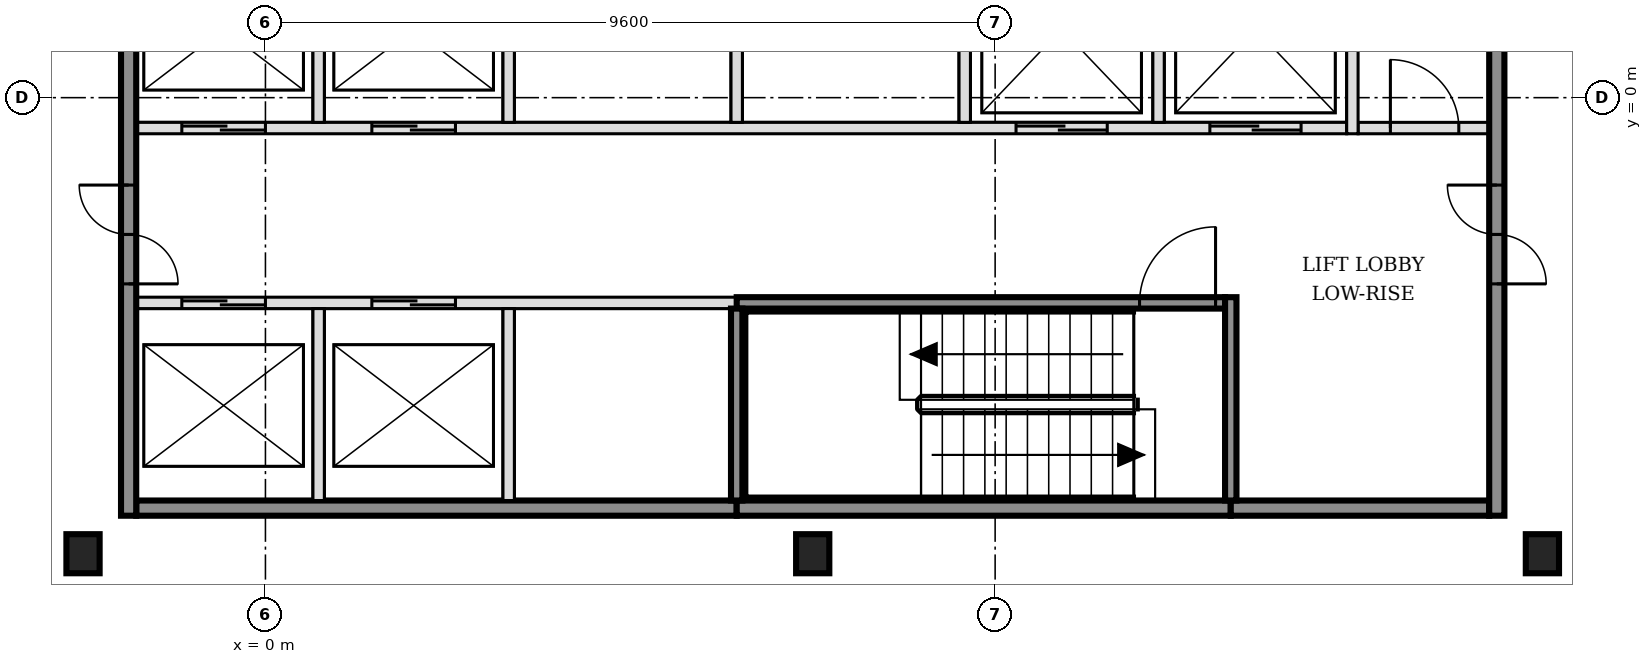
"""IFC4 building model, lengths in metres.
Left out: names, types, materials, properties, quantities, classifications, styles, units other than length and angle.
Written with IfcOpenShell. Run it as: python <this file> out.ifc"""

import sys

from ifc_helpers import new_model, si_unit, direction, frame, frame_2d, origin, origin_2d, place, context, subcontext, project, spatial, rectangle, i_section, extrude, element, fill, save


model = new_model("IFC4")
c1 = context("Model", 3, precision=1e-05, world=origin(), true_north=direction((0.0, 1.0)))
c2 = subcontext(c1, "Body", "Model", "MODEL_VIEW")
j1 = project(units=[si_unit("LENGTHUNIT", "METRE"), si_unit("PLANEANGLEUNIT", "RADIAN")], contexts=[c1])
p1 = place(None, origin())
s1 = spatial("IfcSite", under=j1, at=p1, CompositionType="ELEMENT")
p2 = place(p1, origin())
s2 = spatial("IfcBuilding", under=s1, at=p2, CompositionType="ELEMENT")
p3 = place(p2, frame((0.0, 0.0, 65.4)))
s3 = spatial("IfcBuildingStorey", under=s2, at=p3, CompositionType="ELEMENT", Elevation=65.4)
for number, where, z_axis, x_axis in (
    (1, (-2.4, -6.0, -0.15), (0.0, 0.0, 1.0), (1.0, 0.0, 0.0)),
    (2, (7.2, -6.0, -0.15), (0.0, 0.0, 1.0), (1.0, 0.0, 0.0)),
    (3, (16.8, -6.0, -0.15), (0.0, 0.0, 1.0), (1.0, 0.0, 0.0)),
):
    element("IfcColumn", number, at=place(p3, frame(where, z_axis=z_axis, x_axis=x_axis)), inside=s3, PredefinedType="COLUMN", context=c2, shape_type="SweptSolid", body=[
        extrude(i_section(OverallWidth=0.437, OverallDepth=0.514, WebThickness=0.061, FlangeThickness=0.097, FilletRadius=0.015, at=origin_2d()), origin(), (0.0, 0.0, 1.0), 3.6),
    ])
p4 = place(p3, frame((-1.7, -5.4, 0.0), z_axis=(0.0, 0.0, 1.0), x_axis=(1.0, 0.0, 0.0)))
e4 = element("IfcWall", 4, at=p4, inside=s3, PredefinedType="SOLIDWALL", context=c2, shape_type="SweptSolid", body=[
    extrude(rectangle(XDim=7.9, YDim=0.2, at=frame_2d((3.95, 0.0))), origin(), (0.0, 0.0, 1.0), 3.45),
])
p5 = place(p3, frame((6.2, -5.4, 0.0), z_axis=(0.0, 0.0, 1.0), x_axis=(1.0, 0.0, 0.0)))
e5 = element("IfcWall", 5, at=p5, inside=s3, PredefinedType="SOLIDWALL", context=c2, shape_type="SweptSolid", body=[
    extrude(rectangle(XDim=6.5, YDim=0.2, at=frame_2d((3.25, 0.0))), origin(), (0.0, 0.0, 1.0), 3.45),
])
p6 = place(p3, frame((12.7, -5.4, 0.0), z_axis=(0.0, 0.0, 1.0), x_axis=(1.0, 0.0, 0.0)))
e6 = element("IfcWall", 6, at=p6, inside=s3, PredefinedType="SOLIDWALL", context=c2, shape_type="SweptSolid", body=[
    extrude(rectangle(XDim=3.4, YDim=0.2, at=frame_2d((1.7, 0.0))), origin(), (0.0, 0.0, 1.0), 3.45),
])
p7 = place(p3, frame((-1.7, -2.7, 0.0), z_axis=(0.0, 0.0, 1.0), x_axis=(1.0, 0.0, 0.0)))
e7 = element("IfcWall", 7, at=p7, inside=s3, PredefinedType="SOLIDWALL", context=c2, shape_type="SweptSolid", body=[
    extrude(rectangle(XDim=7.9, YDim=0.15, at=frame_2d((3.95, 0.0))), origin(), (0.0, 0.0, 1.0), 3.45),
])
p8 = place(p7, frame((0.6, 0.0, 0.0)))
e8 = element("IfcOpeningElement", 8, at=p8, cuts=e7, PredefinedType="OPENING", context=c2, shape_type="SweptSolid", body=[
    extrude(rectangle(XDim=1.1, YDim=2.1, at=frame_2d((0.55, 1.05))), frame((0.0, 0.085, 0.0), z_axis=(0.0, -1.0, 0.0), x_axis=(1.0, 0.0, 0.0)), (0.0, 0.0, 1.0), 0.17),
])
p9 = place(p7, frame((3.1, 0.0, 0.0)))
e9 = element("IfcOpeningElement", 9, at=p9, cuts=e7, PredefinedType="OPENING", context=c2, shape_type="SweptSolid", body=[
    extrude(rectangle(XDim=1.1, YDim=2.1, at=frame_2d((0.55, 1.05))), frame((0.0, 0.085, 0.0), z_axis=(0.0, -1.0, 0.0), x_axis=(1.0, 0.0, 0.0)), (0.0, 0.0, 1.0), 0.17),
])
p10 = place(p3, frame((6.2, -2.7, 0.0), z_axis=(0.0, 0.0, 1.0), x_axis=(1.0, 0.0, 0.0)))
e10 = element("IfcWall", 10, at=p10, inside=s3, PredefinedType="SOLIDWALL", context=c2, shape_type="SweptSolid", body=[
    extrude(rectangle(XDim=6.425, YDim=0.15, at=frame_2d((3.212, 0.0))), origin(), (0.0, 0.0, 1.0), 3.45),
])
p11 = place(p10, frame((5.3, 0.0, 0.0)))
e11 = element("IfcOpeningElement", 11, at=p11, cuts=e10, PredefinedType="OPENING", context=c2, shape_type="SweptSolid", body=[
    extrude(rectangle(XDim=1.0, YDim=2.1, at=frame_2d((0.5, 1.05))), frame((0.0, 0.085, 0.0), z_axis=(0.0, -1.0, 0.0), x_axis=(1.0, 0.0, 0.0)), (0.0, 0.0, 1.0), 0.17),
])
p12 = place(p3, frame((-1.7, -0.4, 0.0), z_axis=(0.0, 0.0, 1.0), x_axis=(1.0, 0.0, 0.0)))
e12 = element("IfcWall", 12, at=p12, inside=s3, PredefinedType="SOLIDWALL", context=c2, shape_type="SweptSolid", body=[
    extrude(rectangle(XDim=15.925, YDim=0.15, at=frame_2d((7.962, 0.0))), origin(), (0.0, 0.0, 1.0), 3.45),
])
p13 = place(p12, frame((0.6, 0.0, 0.0)))
e13 = element("IfcOpeningElement", 13, at=p13, cuts=e12, PredefinedType="OPENING", context=c2, shape_type="SweptSolid", body=[
    extrude(rectangle(XDim=1.1, YDim=2.1, at=frame_2d((0.55, 1.05))), frame((0.0, 0.085, 0.0), z_axis=(0.0, -1.0, 0.0), x_axis=(1.0, 0.0, 0.0)), (0.0, 0.0, 1.0), 0.17),
])
p14 = place(p12, frame((3.1, 0.0, 0.0)))
e14 = element("IfcOpeningElement", 14, at=p14, cuts=e12, PredefinedType="OPENING", context=c2, shape_type="SweptSolid", body=[
    extrude(rectangle(XDim=1.1, YDim=2.1, at=frame_2d((0.55, 1.05))), frame((0.0, 0.085, 0.0), z_axis=(0.0, -1.0, 0.0), x_axis=(1.0, 0.0, 0.0)), (0.0, 0.0, 1.0), 0.17),
])
p15 = place(p12, frame((11.575, 0.0, 0.0)))
e15 = element("IfcOpeningElement", 15, at=p15, cuts=e12, PredefinedType="OPENING", context=c2, shape_type="SweptSolid", body=[
    extrude(rectangle(XDim=1.2, YDim=2.1, at=frame_2d((0.6, 1.05))), frame((0.0, 0.085, 0.0), z_axis=(0.0, -1.0, 0.0), x_axis=(1.0, 0.0, 0.0)), (0.0, 0.0, 1.0), 0.17),
])
p16 = place(p12, frame((14.125, 0.0, 0.0)))
e16 = element("IfcOpeningElement", 16, at=p16, cuts=e12, PredefinedType="OPENING", context=c2, shape_type="SweptSolid", body=[
    extrude(rectangle(XDim=1.2, YDim=2.1, at=frame_2d((0.6, 1.05))), frame((0.0, 0.085, 0.0), z_axis=(0.0, -1.0, 0.0), x_axis=(1.0, 0.0, 0.0)), (0.0, 0.0, 1.0), 0.17),
])
p17 = place(p3, frame((14.375, -0.4, 0.0), z_axis=(0.0, 0.0, 1.0), x_axis=(1.0, 0.0, 0.0)))
e17 = element("IfcWall", 17, at=p17, inside=s3, PredefinedType="PARTITIONING", context=c2, shape_type="SweptSolid", body=[
    extrude(rectangle(XDim=1.725, YDim=0.15, at=frame_2d((0.863, 0.0))), origin(), (0.0, 0.0, 1.0), 3.45),
])
p18 = place(p17, frame((0.425, 0.0, 0.0)))
e18 = element("IfcOpeningElement", 18, at=p18, cuts=e17, PredefinedType="OPENING", context=c2, shape_type="SweptSolid", body=[
    extrude(rectangle(XDim=0.9, YDim=2.1, at=frame_2d((0.45, 1.05))), frame((0.0, 0.085, 0.0), z_axis=(0.0, -1.0, 0.0), x_axis=(1.0, 0.0, 0.0)), (0.0, 0.0, 1.0), 0.17),
])
p19 = place(p3, frame((-1.8, -5.5, 0.0), z_axis=(0.0, 0.0, 1.0), x_axis=(0.0, 1.0, 0.0)))
e19 = element("IfcWall", 19, at=p19, inside=s3, PredefinedType="SOLIDWALL", context=c2, shape_type="SweptSolid", body=[
    extrude(rectangle(XDim=15.8, YDim=0.2, at=frame_2d((7.9, 0.0))), origin(), (0.0, 0.0, 1.0), 3.45),
])
p20 = place(p19, frame((3.05, 0.0, 0.0)))
e20 = element("IfcOpeningElement", 20, at=p20, cuts=e19, PredefinedType="OPENING", context=c2, shape_type="SweptSolid", body=[
    extrude(rectangle(XDim=1.3, YDim=2.1, at=frame_2d((0.65, 1.05))), frame((0.0, 0.11, 0.0), z_axis=(0.0, -1.0, 0.0), x_axis=(1.0, 0.0, 0.0)), (0.0, 0.0, 1.0), 0.22),
])
p21 = place(p19, frame((11.45, 0.0, 0.0)))
e21 = element("IfcOpeningElement", 21, at=p21, cuts=e19, PredefinedType="OPENING", context=c2, shape_type="SweptSolid", body=[
    extrude(rectangle(XDim=1.3, YDim=2.1, at=frame_2d((0.65, 1.05))), frame((0.0, 0.11, 0.0), z_axis=(0.0, -1.0, 0.0), x_axis=(1.0, 0.0, 0.0)), (0.0, 0.0, 1.0), 0.22),
])
p22 = place(p3, frame((0.7, -5.3, 0.0), z_axis=(0.0, 0.0, 1.0), x_axis=(0.0, 1.0, 0.0)))
e22 = element("IfcWall", 22, at=p22, inside=s3, PredefinedType="SOLIDWALL", context=c2, shape_type="SweptSolid", body=[
    extrude(rectangle(XDim=2.525, YDim=0.15, at=frame_2d((1.263, 0.0))), origin(), (0.0, 0.0, 1.0), 3.45),
])
p23 = place(p3, frame((0.7, -0.325, 0.0), z_axis=(0.0, 0.0, 1.0), x_axis=(0.0, 1.0, 0.0)))
e23 = element("IfcWall", 23, at=p23, inside=s3, PredefinedType="SOLIDWALL", context=c2, shape_type="SweptSolid", body=[
    extrude(rectangle(XDim=2.45, YDim=0.15, at=frame_2d((1.225, 0.0))), origin(), (0.0, 0.0, 1.0), 3.45),
])
p24 = place(p3, frame((3.2, -5.3, 0.0), z_axis=(0.0, 0.0, 1.0), x_axis=(0.0, 1.0, 0.0)))
e24 = element("IfcWall", 24, at=p24, inside=s3, PredefinedType="SOLIDWALL", context=c2, shape_type="SweptSolid", body=[
    extrude(rectangle(XDim=2.525, YDim=0.15, at=frame_2d((1.263, 0.0))), origin(), (0.0, 0.0, 1.0), 3.45),
])
p25 = place(p3, frame((3.2, -0.325, 0.0), z_axis=(0.0, 0.0, 1.0), x_axis=(0.0, 1.0, 0.0)))
e25 = element("IfcWall", 25, at=p25, inside=s3, PredefinedType="SOLIDWALL", context=c2, shape_type="SweptSolid", body=[
    extrude(rectangle(XDim=2.45, YDim=0.15, at=frame_2d((1.225, 0.0))), origin(), (0.0, 0.0, 1.0), 3.45),
])
p26 = place(p3, frame((6.2, -5.3, 0.0), z_axis=(0.0, 0.0, 1.0), x_axis=(0.0, 1.0, 0.0)))
e26 = element("IfcWall", 26, at=p26, inside=s3, PredefinedType="SOLIDWALL", context=c2, shape_type="SweptSolid", body=[
    extrude(rectangle(XDim=2.525, YDim=0.15, at=frame_2d((1.263, 0.0))), origin(), (0.0, 0.0, 1.0), 3.45),
])
for number, where, z_axis, x_axis in (
    (27, (6.2, -0.325, 0.0), (0.0, 0.0, 1.0), (0.0, 1.0, 0.0)),
    (28, (9.2, -0.325, 0.0), (0.0, 0.0, 1.0), (0.0, 1.0, 0.0)),
    (29, (11.75, -0.325, 0.0), (0.0, 0.0, 1.0), (0.0, 1.0, 0.0)),
):
    element("IfcWall", number, at=place(p3, frame(where, z_axis=z_axis, x_axis=x_axis)), inside=s3, PredefinedType="SOLIDWALL", context=c2, shape_type="SweptSolid", body=[
        extrude(rectangle(XDim=2.45, YDim=0.15, at=frame_2d((1.225, 0.0))), origin(), (0.0, 0.0, 1.0), 3.45),
    ])
p27 = place(p3, frame((12.7, -5.3, 0.0), z_axis=(0.0, 0.0, 1.0), x_axis=(0.0, 1.0, 0.0)))
e30 = element("IfcWall", 30, at=p27, inside=s3, PredefinedType="SOLIDWALL", context=c2, shape_type="SweptSolid", body=[
    extrude(rectangle(XDim=2.675, YDim=0.15, at=frame_2d((1.337, 0.0))), origin(), (0.0, 0.0, 1.0), 3.45),
])
p28 = place(p3, frame((14.3, -0.475, 0.0), z_axis=(0.0, 0.0, 1.0), x_axis=(0.0, 1.0, 0.0)))
e31 = element("IfcWall", 31, at=p28, inside=s3, PredefinedType="SOLIDWALL", context=c2, shape_type="SweptSolid", body=[
    extrude(rectangle(XDim=2.75, YDim=0.15, at=frame_2d((1.375, 0.0))), origin(), (0.0, 0.0, 1.0), 3.45),
])
p29 = place(p3, frame((16.2, -5.5, 0.0), z_axis=(0.0, 0.0, 1.0), x_axis=(0.0, 1.0, 0.0)))
e32 = element("IfcWall", 32, at=p29, inside=s3, PredefinedType="SOLIDWALL", context=c2, shape_type="SweptSolid", body=[
    extrude(rectangle(XDim=15.8, YDim=0.2, at=frame_2d((7.9, 0.0))), origin(), (0.0, 0.0, 1.0), 3.45),
])
p30 = place(p29, frame((3.05, 0.0, 0.0)))
e33 = element("IfcOpeningElement", 33, at=p30, cuts=e32, PredefinedType="OPENING", context=c2, shape_type="SweptSolid", body=[
    extrude(rectangle(XDim=1.3, YDim=2.1, at=frame_2d((0.65, 1.05))), frame((0.0, 0.11, 0.0), z_axis=(0.0, -1.0, 0.0), x_axis=(1.0, 0.0, 0.0)), (0.0, 0.0, 1.0), 0.22),
])
p31 = place(p29, frame((11.45, 0.0, 0.0)))
e34 = element("IfcOpeningElement", 34, at=p31, cuts=e32, PredefinedType="OPENING", context=c2, shape_type="SweptSolid", body=[
    extrude(rectangle(XDim=1.3, YDim=2.1, at=frame_2d((0.65, 1.05))), frame((0.0, 0.11, 0.0), z_axis=(0.0, -1.0, 0.0), x_axis=(1.0, 0.0, 0.0)), (0.0, 0.0, 1.0), 0.22),
])
p32 = place(p8, origin())
e35 = element("IfcDoor", 35, at=p32, inside=s3, OperationType="DOUBLE_DOOR_SLIDING", PredefinedType="DOOR", context=c2, shape_type="SweptSolid", body=[
    extrude(rectangle(XDim=1.1, YDim=2.1, at=frame_2d((0.55, 1.05))), frame((0.0, 0.025, 0.0), z_axis=(0.0, -1.0, 0.0), x_axis=(1.0, 0.0, 0.0)), (0.0, 0.0, 1.0), 0.05),
])
fill(e8, e35)
p33 = place(p9, origin())
e36 = element("IfcDoor", 36, at=p33, inside=s3, OperationType="DOUBLE_DOOR_SLIDING", PredefinedType="DOOR", context=c2, shape_type="SweptSolid", body=[
    extrude(rectangle(XDim=1.1, YDim=2.1, at=frame_2d((0.55, 1.05))), frame((0.0, 0.025, 0.0), z_axis=(0.0, -1.0, 0.0), x_axis=(1.0, 0.0, 0.0)), (0.0, 0.0, 1.0), 0.05),
])
fill(e9, e36)
p34 = place(p13, origin())
e37 = element("IfcDoor", 37, at=p34, inside=s3, OperationType="DOUBLE_DOOR_SLIDING", PredefinedType="DOOR", context=c2, shape_type="SweptSolid", body=[
    extrude(rectangle(XDim=1.1, YDim=2.1, at=frame_2d((0.55, 1.05))), frame((0.0, 0.025, 0.0), z_axis=(0.0, -1.0, 0.0), x_axis=(1.0, 0.0, 0.0)), (0.0, 0.0, 1.0), 0.05),
])
fill(e13, e37)
p35 = place(p14, origin())
e38 = element("IfcDoor", 38, at=p35, inside=s3, OperationType="DOUBLE_DOOR_SLIDING", PredefinedType="DOOR", context=c2, shape_type="SweptSolid", body=[
    extrude(rectangle(XDim=1.1, YDim=2.1, at=frame_2d((0.55, 1.05))), frame((0.0, 0.025, 0.0), z_axis=(0.0, -1.0, 0.0), x_axis=(1.0, 0.0, 0.0)), (0.0, 0.0, 1.0), 0.05),
])
fill(e14, e38)
p36 = place(p15, origin())
e39 = element("IfcDoor", 39, at=p36, inside=s3, OperationType="DOUBLE_DOOR_SLIDING", PredefinedType="DOOR", context=c2, shape_type="SweptSolid", body=[
    extrude(rectangle(XDim=1.2, YDim=2.1, at=frame_2d((0.6, 1.05))), frame((0.0, 0.025, 0.0), z_axis=(0.0, -1.0, 0.0), x_axis=(1.0, 0.0, 0.0)), (0.0, 0.0, 1.0), 0.05),
])
fill(e15, e39)
p37 = place(p16, origin())
e40 = element("IfcDoor", 40, at=p37, inside=s3, OperationType="DOUBLE_DOOR_SLIDING", PredefinedType="DOOR", context=c2, shape_type="SweptSolid", body=[
    extrude(rectangle(XDim=1.2, YDim=2.1, at=frame_2d((0.6, 1.05))), frame((0.0, 0.025, 0.0), z_axis=(0.0, -1.0, 0.0), x_axis=(1.0, 0.0, 0.0)), (0.0, 0.0, 1.0), 0.05),
])
fill(e16, e40)
p38 = place(p11, origin())
e41 = element("IfcDoor", 41, at=p38, inside=s3, OperationType="SINGLE_SWING_RIGHT", PredefinedType="DOOR", context=c2, shape_type="SweptSolid", body=[
    extrude(rectangle(XDim=1.0, YDim=2.1, at=frame_2d((0.5, 1.05))), frame((0.0, 0.025, 0.0), z_axis=(0.0, -1.0, 0.0), x_axis=(1.0, 0.0, 0.0)), (0.0, 0.0, 1.0), 0.05),
])
fill(e11, e41)
p39 = place(p20, origin())
e42 = element("IfcDoor", 42, at=p39, inside=s3, OperationType="DOUBLE_DOOR_SINGLE_SWING", PredefinedType="DOOR", context=c2, shape_type="SweptSolid", body=[
    extrude(rectangle(XDim=1.3, YDim=2.1, at=frame_2d((0.65, 1.05))), frame((0.0, 0.025, 0.0), z_axis=(0.0, -1.0, 0.0), x_axis=(1.0, 0.0, 0.0)), (0.0, 0.0, 1.0), 0.05),
])
fill(e20, e42)
p40 = place(p30, origin())
e43 = element("IfcDoor", 43, at=p40, inside=s3, OperationType="DOUBLE_DOOR_SINGLE_SWING", PredefinedType="DOOR", context=c2, shape_type="SweptSolid", body=[
    extrude(rectangle(XDim=1.3, YDim=2.1, at=frame_2d((0.65, 1.05))), frame((0.0, 0.025, 0.0), z_axis=(0.0, -1.0, 0.0), x_axis=(1.0, 0.0, 0.0)), (0.0, 0.0, 1.0), 0.05),
])
fill(e33, e43)
p41 = place(p18, origin())
e44 = element("IfcDoor", 44, at=p41, inside=s3, OperationType="SINGLE_SWING_LEFT", PredefinedType="DOOR", context=c2, shape_type="SweptSolid", body=[
    extrude(rectangle(XDim=0.9, YDim=2.1, at=frame_2d((0.45, 1.05))), frame((0.0, 0.025, 0.0), z_axis=(0.0, -1.0, 0.0), x_axis=(1.0, 0.0, 0.0)), (0.0, 0.0, 1.0), 0.05),
])
fill(e18, e44)
save(model, sys.argv[1])
